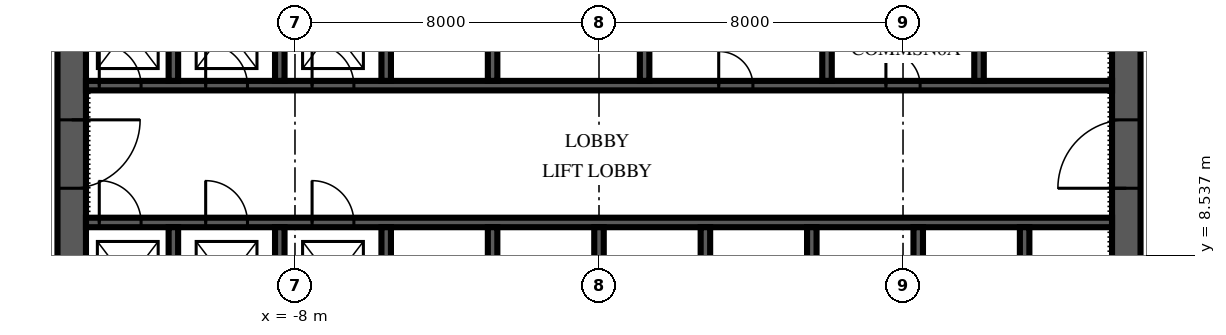
"""IFC4 building model, lengths in metres.
Left out: names, types, materials, properties, quantities, classifications, styles, units other than length and angle.
Written with IfcOpenShell. Run it as: python <this file> out.ifc"""

import sys

from ifc_helpers import new_model, si_unit, direction, frame, frame_2d, origin, place, context, subcontext, project, spatial, polyline, rectangle, outline, extrude, element, fill, save


model = new_model("IFC4")
c1 = context("Model", 3, precision=1e-05, world=origin(), true_north=direction((0.0, 1.0)))
c2 = subcontext(c1, "Body", "Model", "MODEL_VIEW")
j1 = project(units=[si_unit("LENGTHUNIT", "METRE"), si_unit("PLANEANGLEUNIT", "RADIAN")], contexts=[c1])
p1 = place(None, origin())
s1 = spatial("IfcSite", under=j1, at=p1, CompositionType="ELEMENT")
p2 = place(p1, origin())
s2 = spatial("IfcBuilding", under=s1, at=p2, CompositionType="ELEMENT")
p3 = place(p2, frame((0.0, 0.0, 115.0)))
s3 = spatial("IfcBuildingStorey", under=s2, at=p3, CompositionType="ELEMENT", Elevation=115.0)
p4 = place(p3, frame((13.875, 6.125, 0.0), z_axis=(0.0, 0.0, 1.0), x_axis=(0.0, 1.0, 0.0)))
e1 = element("IfcWall", 1, at=p4, inside=s3, PredefinedType="SHEAR", context=c2, shape_type="SweptSolid", body=[
    extrude(outline(polyline([(0.0, -0.375), (17.75, -0.375), (17.75, 0.0), (17.375, 0.0), (17.375, 0.375), (0.375, 0.375), (0.375, 0.0), (0.0, 0.0), (0.0, -0.375)])), origin(), (0.0, 0.0, 1.0), 4.0),
])
p5 = place(p4, frame((4.175, 0.0, 0.0)))
e2 = element("IfcOpeningElement", 2, at=p5, cuts=e1, PredefinedType="OPENING", context=c2, shape_type="SweptSolid", body=[
    extrude(rectangle(XDim=1.8, YDim=2.4, at=frame_2d((0.9, 1.2))), frame((0.0, 0.39, 0.0), z_axis=(0.0, -1.0, 0.0), x_axis=(1.0, 0.0, 0.0)), (0.0, 0.0, 1.0), 0.78),
])
p6 = place(p3, frame((-13.875, 23.875, 0.0), z_axis=(0.0, 0.0, 1.0), x_axis=(0.0, -1.0, 0.0)))
e3 = element("IfcWall", 3, at=p6, inside=s3, PredefinedType="SHEAR", context=c2, shape_type="SweptSolid", body=[
    extrude(outline(polyline([(0.0, -0.375), (17.75, -0.375), (17.75, 0.0), (17.375, 0.0), (17.375, 0.375), (0.375, 0.375), (0.375, 0.0), (0.0, 0.0), (0.0, -0.375)])), origin(), (0.0, 0.0, 1.0), 4.0),
])
p7 = place(p6, frame((11.775, 0.0, 0.0)))
e4 = element("IfcOpeningElement", 4, at=p7, cuts=e3, PredefinedType="OPENING", context=c2, shape_type="SweptSolid", body=[
    extrude(rectangle(XDim=1.8, YDim=2.4, at=frame_2d((0.9, 1.2))), frame((0.0, 0.39, 0.0), z_axis=(0.0, -1.0, 0.0), x_axis=(1.0, 0.0, 0.0)), (0.0, 0.0, 1.0), 0.78),
])
p8 = place(p3, frame((-13.5, 9.4, 0.0), z_axis=(0.0, 0.0, 1.0), x_axis=(1.0, 0.0, 0.0)))
e5 = element("IfcWall", 5, at=p8, inside=s3, PredefinedType="SHEAR", context=c2, shape_type="SweptSolid", body=[
    extrude(rectangle(XDim=27.0, YDim=0.25, at=frame_2d((13.5, 0.0))), origin(), (0.0, 0.0, 1.0), 4.0),
])
p9 = place(p8, frame((0.35, 0.0, 0.0)))
e6 = element("IfcOpeningElement", 6, at=p9, cuts=e5, PredefinedType="OPENING", context=c2, shape_type="SweptSolid", body=[
    extrude(rectangle(XDim=1.1, YDim=2.1, at=frame_2d((0.55, 1.05))), frame((0.0, 0.14, 0.0), z_axis=(0.0, -1.0, 0.0), x_axis=(1.0, 0.0, 0.0)), (0.0, 0.0, 1.0), 0.28),
])
p10 = place(p8, frame((3.15, 0.0, 0.0)))
e7 = element("IfcOpeningElement", 7, at=p10, cuts=e5, PredefinedType="OPENING", context=c2, shape_type="SweptSolid", body=[
    extrude(rectangle(XDim=1.1, YDim=2.1, at=frame_2d((0.55, 1.05))), frame((0.0, 0.14, 0.0), z_axis=(0.0, -1.0, 0.0), x_axis=(1.0, 0.0, 0.0)), (0.0, 0.0, 1.0), 0.28),
])
p11 = place(p8, frame((5.95, 0.0, 0.0)))
e8 = element("IfcOpeningElement", 8, at=p11, cuts=e5, PredefinedType="OPENING", context=c2, shape_type="SweptSolid", body=[
    extrude(rectangle(XDim=1.1, YDim=2.1, at=frame_2d((0.55, 1.05))), frame((0.0, 0.14, 0.0), z_axis=(0.0, -1.0, 0.0), x_axis=(1.0, 0.0, 0.0)), (0.0, 0.0, 1.0), 0.28),
])
p12 = place(p3, frame((-13.5, 13.0, 0.0), z_axis=(0.0, 0.0, 1.0), x_axis=(1.0, 0.0, 0.0)))
e9 = element("IfcWall", 9, at=p12, inside=s3, PredefinedType="SHEAR", context=c2, shape_type="SweptSolid", body=[
    extrude(rectangle(XDim=27.0, YDim=0.25, at=frame_2d((13.5, 0.0))), origin(), (0.0, 0.0, 1.0), 4.0),
])
p13 = place(p12, frame((0.35, 0.0, 0.0)))
e10 = element("IfcOpeningElement", 10, at=p13, cuts=e9, PredefinedType="OPENING", context=c2, shape_type="SweptSolid", body=[
    extrude(rectangle(XDim=1.1, YDim=2.1, at=frame_2d((0.55, 1.05))), frame((0.0, 0.14, 0.0), z_axis=(0.0, -1.0, 0.0), x_axis=(1.0, 0.0, 0.0)), (0.0, 0.0, 1.0), 0.28),
])
p14 = place(p12, frame((3.15, 0.0, 0.0)))
e11 = element("IfcOpeningElement", 11, at=p14, cuts=e9, PredefinedType="OPENING", context=c2, shape_type="SweptSolid", body=[
    extrude(rectangle(XDim=1.1, YDim=2.1, at=frame_2d((0.55, 1.05))), frame((0.0, 0.14, 0.0), z_axis=(0.0, -1.0, 0.0), x_axis=(1.0, 0.0, 0.0)), (0.0, 0.0, 1.0), 0.28),
])
p15 = place(p12, frame((5.95, 0.0, 0.0)))
e12 = element("IfcOpeningElement", 12, at=p15, cuts=e9, PredefinedType="OPENING", context=c2, shape_type="SweptSolid", body=[
    extrude(rectangle(XDim=1.1, YDim=2.1, at=frame_2d((0.55, 1.05))), frame((0.0, 0.14, 0.0), z_axis=(0.0, -1.0, 0.0), x_axis=(1.0, 0.0, 0.0)), (0.0, 0.0, 1.0), 0.28),
])
p16 = place(p12, frame((16.65, 0.0, 0.0)))
e13 = element("IfcOpeningElement", 13, at=p16, cuts=e9, PredefinedType="OPENING", context=c2, shape_type="SweptSolid", body=[
    extrude(rectangle(XDim=0.9, YDim=2.1, at=frame_2d((0.45, 1.05))), frame((0.0, 0.14, 0.0), z_axis=(0.0, -1.0, 0.0), x_axis=(1.0, 0.0, 0.0)), (0.0, 0.0, 1.0), 0.28),
])
p17 = place(p12, frame((21.05, 0.0, 0.0)))
e14 = element("IfcOpeningElement", 14, at=p17, cuts=e9, PredefinedType="OPENING", context=c2, shape_type="SweptSolid", body=[
    extrude(rectangle(XDim=0.9, YDim=2.1, at=frame_2d((0.45, 1.05))), frame((0.0, 0.14, 0.0), z_axis=(0.0, -1.0, 0.0), x_axis=(1.0, 0.0, 0.0)), (0.0, 0.0, 1.0), 0.28),
])
for number, where, z_axis, x_axis in (
    (15, (-11.2, 6.5, 0.0), (0.0, 0.0, 1.0), (0.0, 1.0, 0.0)),
    (16, (-8.4, 6.5, 0.0), (0.0, 0.0, 1.0), (0.0, 1.0, 0.0)),
    (17, (-5.6, 6.5, 0.0), (0.0, 0.0, 1.0), (0.0, 1.0, 0.0)),
    (18, (-2.8, 6.5, 0.0), (0.0, 0.0, 1.0), (0.0, 1.0, 0.0)),
    (19, (0.0, 6.5, 0.0), (0.0, 0.0, 1.0), (0.0, 1.0, 0.0)),
    (20, (2.8, 6.5, 0.0), (0.0, 0.0, 1.0), (0.0, 1.0, 0.0)),
    (21, (5.6, 6.5, 0.0), (0.0, 0.0, 1.0), (0.0, 1.0, 0.0)),
    (22, (8.4, 6.5, 0.0), (0.0, 0.0, 1.0), (0.0, 1.0, 0.0)),
    (23, (11.2, 6.5, 0.0), (0.0, 0.0, 1.0), (0.0, 1.0, 0.0)),
):
    element("IfcWall", number, at=place(p3, frame(where, z_axis=z_axis, x_axis=x_axis)), inside=s3, PredefinedType="SHEAR", context=c2, shape_type="SweptSolid", body=[
        extrude(rectangle(XDim=2.775, YDim=0.25, at=frame_2d((1.387, 0.0))), origin(), (0.0, 0.0, 1.0), 4.0),
    ])
for number, where, z_axis, x_axis in (
    (24, (-11.2, 13.125, 0.0), (0.0, 0.0, 1.0), (0.0, 1.0, 0.0)),
    (25, (-8.4, 13.125, 0.0), (0.0, 0.0, 1.0), (0.0, 1.0, 0.0)),
    (26, (-5.6, 13.125, 0.0), (0.0, 0.0, 1.0), (0.0, 1.0, 0.0)),
    (27, (-2.8, 13.125, 0.0), (0.0, 0.0, 1.0), (0.0, 1.0, 0.0)),
    (28, (1.2, 13.125, 0.0), (0.0, 0.0, 1.0), (0.0, 1.0, 0.0)),
    (29, (6.0, 13.125, 0.0), (0.0, 0.0, 1.0), (0.0, 1.0, 0.0)),
    (30, (10.0, 13.125, 0.0), (0.0, 0.0, 1.0), (0.0, 1.0, 0.0)),
):
    element("IfcWall", number, at=place(p3, frame(where, z_axis=z_axis, x_axis=x_axis)), inside=s3, PredefinedType="SHEAR", context=c2, shape_type="SweptSolid", body=[
        extrude(rectangle(XDim=2.75, YDim=0.25, at=frame_2d((1.375, 0.0))), origin(), (0.0, 0.0, 1.0), 4.0),
    ])
p18 = place(p5, origin())
e31 = element("IfcDoor", 31, at=p18, inside=s3, OperationType="DOUBLE_DOOR_SINGLE_SWING", PredefinedType="DOOR", context=c2, shape_type="SweptSolid", body=[
    extrude(rectangle(XDim=1.8, YDim=2.4, at=frame_2d((0.9, 1.2))), frame((0.0, 0.375, 0.0), z_axis=(0.0, -1.0, 0.0), x_axis=(1.0, 0.0, 0.0)), (0.0, 0.0, 1.0), 0.75),
])
fill(e2, e31)
p19 = place(p7, origin())
e32 = element("IfcDoor", 32, at=p19, inside=s3, OperationType="DOUBLE_DOOR_SINGLE_SWING", PredefinedType="DOOR", context=c2, shape_type="SweptSolid", body=[
    extrude(rectangle(XDim=1.8, YDim=2.4, at=frame_2d((0.9, 1.2))), frame((0.0, 0.375, 0.0), z_axis=(0.0, -1.0, 0.0), x_axis=(1.0, 0.0, 0.0)), (0.0, 0.0, 1.0), 0.75),
])
fill(e4, e32)
p20 = place(p9, origin())
e33 = element("IfcDoor", 33, at=p20, inside=s3, OperationType="SLIDING_TO_LEFT", PredefinedType="DOOR", context=c2, shape_type="SweptSolid", body=[
    extrude(rectangle(XDim=1.1, YDim=2.1, at=frame_2d((0.55, 1.05))), frame((0.0, 0.125, 0.0), z_axis=(0.0, -1.0, 0.0), x_axis=(1.0, 0.0, 0.0)), (0.0, 0.0, 1.0), 0.25),
])
fill(e6, e33)
p21 = place(p10, origin())
e34 = element("IfcDoor", 34, at=p21, inside=s3, OperationType="SLIDING_TO_LEFT", PredefinedType="DOOR", context=c2, shape_type="SweptSolid", body=[
    extrude(rectangle(XDim=1.1, YDim=2.1, at=frame_2d((0.55, 1.05))), frame((0.0, 0.125, 0.0), z_axis=(0.0, -1.0, 0.0), x_axis=(1.0, 0.0, 0.0)), (0.0, 0.0, 1.0), 0.25),
])
fill(e7, e34)
p22 = place(p11, origin())
e35 = element("IfcDoor", 35, at=p22, inside=s3, OperationType="SLIDING_TO_LEFT", PredefinedType="DOOR", context=c2, shape_type="SweptSolid", body=[
    extrude(rectangle(XDim=1.1, YDim=2.1, at=frame_2d((0.55, 1.05))), frame((0.0, 0.125, 0.0), z_axis=(0.0, -1.0, 0.0), x_axis=(1.0, 0.0, 0.0)), (0.0, 0.0, 1.0), 0.25),
])
fill(e8, e35)
p23 = place(p13, origin())
e36 = element("IfcDoor", 36, at=p23, inside=s3, OperationType="SLIDING_TO_LEFT", PredefinedType="DOOR", context=c2, shape_type="SweptSolid", body=[
    extrude(rectangle(XDim=1.1, YDim=2.1, at=frame_2d((0.55, 1.05))), frame((0.0, 0.125, 0.0), z_axis=(0.0, -1.0, 0.0), x_axis=(1.0, 0.0, 0.0)), (0.0, 0.0, 1.0), 0.25),
])
fill(e10, e36)
p24 = place(p14, origin())
e37 = element("IfcDoor", 37, at=p24, inside=s3, OperationType="SLIDING_TO_LEFT", PredefinedType="DOOR", context=c2, shape_type="SweptSolid", body=[
    extrude(rectangle(XDim=1.1, YDim=2.1, at=frame_2d((0.55, 1.05))), frame((0.0, 0.125, 0.0), z_axis=(0.0, -1.0, 0.0), x_axis=(1.0, 0.0, 0.0)), (0.0, 0.0, 1.0), 0.25),
])
fill(e11, e37)
p25 = place(p15, origin())
e38 = element("IfcDoor", 38, at=p25, inside=s3, OperationType="SLIDING_TO_LEFT", PredefinedType="DOOR", context=c2, shape_type="SweptSolid", body=[
    extrude(rectangle(XDim=1.1, YDim=2.1, at=frame_2d((0.55, 1.05))), frame((0.0, 0.125, 0.0), z_axis=(0.0, -1.0, 0.0), x_axis=(1.0, 0.0, 0.0)), (0.0, 0.0, 1.0), 0.25),
])
fill(e12, e38)
p26 = place(p16, origin())
e39 = element("IfcDoor", 39, at=p26, inside=s3, OperationType="SINGLE_SWING_LEFT", PredefinedType="DOOR", context=c2, shape_type="SweptSolid", body=[
    extrude(rectangle(XDim=0.9, YDim=2.1, at=frame_2d((0.45, 1.05))), frame((0.0, 0.125, 0.0), z_axis=(0.0, -1.0, 0.0), x_axis=(1.0, 0.0, 0.0)), (0.0, 0.0, 1.0), 0.25),
])
fill(e13, e39)
p27 = place(p17, origin())
e40 = element("IfcDoor", 40, at=p27, inside=s3, OperationType="SINGLE_SWING_LEFT", PredefinedType="DOOR", context=c2, shape_type="SweptSolid", body=[
    extrude(rectangle(XDim=0.9, YDim=2.1, at=frame_2d((0.45, 1.05))), frame((0.0, 0.125, 0.0), z_axis=(0.0, -1.0, 0.0), x_axis=(1.0, 0.0, 0.0)), (0.0, 0.0, 1.0), 0.25),
])
fill(e14, e40)
save(model, sys.argv[1])
